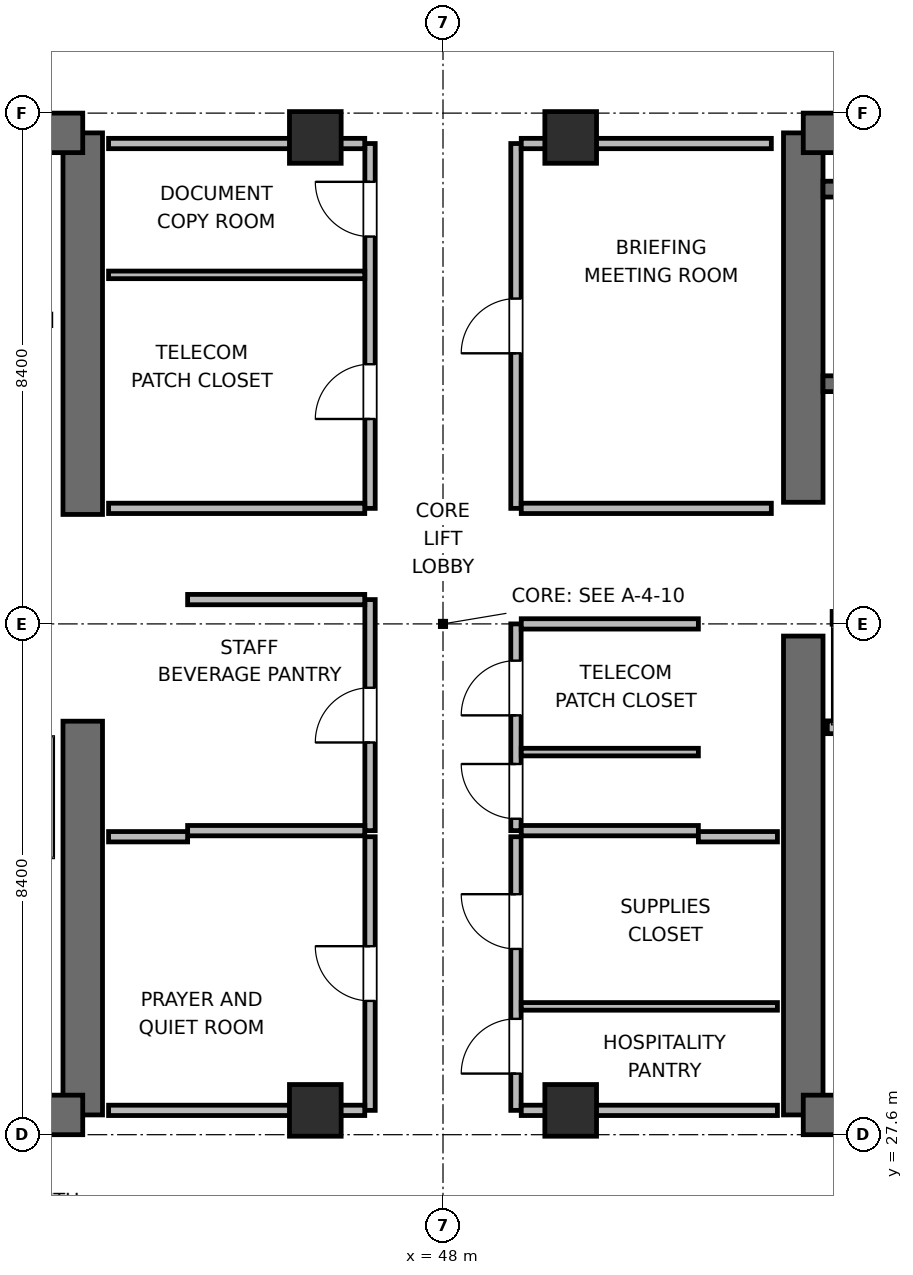
"""IFC4 building model, lengths in metres.
Left out: names, types, materials, properties, quantities, classifications, styles, units other than length and angle.
Written with IfcOpenShell. Run it as: python <this file> out.ifc"""

import sys

from ifc_helpers import new_model, si_unit, direction, frame, frame_2d, origin, origin_2d, place, context, subcontext, project, spatial, rectangle, extrude, element, fill, save


model = new_model("IFC4")
c1 = context("Model", 3, precision=1e-05, world=origin(), true_north=direction((0.0, 1.0)))
c2 = subcontext(c1, "Body", "Model", "MODEL_VIEW")
j1 = project(units=[si_unit("LENGTHUNIT", "METRE"), si_unit("PLANEANGLEUNIT", "RADIAN")], contexts=[c1])
p1 = place(None, origin())
s1 = spatial("IfcSite", under=j1, at=p1, CompositionType="ELEMENT")
p2 = place(p1, origin())
s2 = spatial("IfcBuilding", under=s1, at=p2, CompositionType="ELEMENT")
p3 = place(p2, frame((0.0, 0.0, 214.8)))
s3 = spatial("IfcBuildingStorey", under=s2, at=p3, CompositionType="ELEMENT", Elevation=214.8)
p4 = place(p3, frame((42.075, 27.925, 0.0), z_axis=(0.0, 0.0, 1.0), x_axis=(0.0, 1.0, 0.0)))
e1 = element("IfcWall", 1, at=p4, inside=s3, PredefinedType="SHEAR", context=c2, shape_type="SweptSolid", body=[
    extrude(rectangle(XDim=6.475, YDim=0.65, at=frame_2d((3.237, 0.0))), origin(), (0.0, 0.0, 1.0), 4.5),
])
p5 = place(p3, frame((42.075, 37.8, 0.0), z_axis=(0.0, 0.0, 1.0), x_axis=(0.0, 1.0, 0.0)))
e2 = element("IfcWall", 2, at=p5, inside=s3, PredefinedType="SHEAR", context=c2, shape_type="SweptSolid", body=[
    extrude(rectangle(XDim=6.275, YDim=0.65, at=frame_2d((3.137, 0.0))), origin(), (0.0, 0.0, 1.0), 4.5),
])
p6 = place(p3, frame((32.725, 27.925, 0.0), z_axis=(0.0, 0.0, 1.0), x_axis=(1.0, 0.0, 0.0)))
e3 = element("IfcWall", 3, at=p6, inside=s3, PredefinedType="SHEAR", context=c2, shape_type="SweptSolid", body=[
    extrude(rectangle(XDim=9.35, YDim=0.65, at=frame_2d((4.675, 0.0))), origin(), (0.0, 0.0, 1.0), 4.5),
])
p7 = place(p6, frame((5.025, 0.0, 0.0)))
e4 = element("IfcOpeningElement", 4, at=p7, cuts=e3, PredefinedType="OPENING", context=c2, shape_type="SweptSolid", body=[
    extrude(rectangle(XDim=1.05, YDim=2.04, at=frame_2d((0.525, 1.02))), frame((0.0, 0.335, 0.0), z_axis=(0.0, -1.0, 0.0), x_axis=(1.0, 0.0, 0.0)), (0.0, 0.0, 1.0), 0.67),
])
p8 = place(p3, frame((32.725, 44.075, 0.0), z_axis=(0.0, 0.0, 1.0), x_axis=(1.0, 0.0, 0.0)))
e5 = element("IfcWall", 5, at=p8, inside=s3, PredefinedType="SHEAR", context=c2, shape_type="SweptSolid", body=[
    extrude(rectangle(XDim=9.35, YDim=0.65, at=frame_2d((4.675, 0.0))), origin(), (0.0, 0.0, 1.0), 4.5),
])
p9 = place(p8, frame((1.025, 0.0, 0.0)))
e6 = element("IfcOpeningElement", 6, at=p9, cuts=e5, PredefinedType="OPENING", context=c2, shape_type="SweptSolid", body=[
    extrude(rectangle(XDim=0.95, YDim=2.04, at=frame_2d((0.475, 1.02))), frame((0.0, 0.335, 0.0), z_axis=(0.0, -1.0, 0.0), x_axis=(1.0, 0.0, 0.0)), (0.0, 0.0, 1.0), 0.67),
])
p10 = place(p8, frame((4.275, 0.0, 0.0)))
e7 = element("IfcOpeningElement", 7, at=p10, cuts=e5, PredefinedType="OPENING", context=c2, shape_type="SweptSolid", body=[
    extrude(rectangle(XDim=0.9, YDim=2.02, at=frame_2d((0.45, 1.01))), frame((0.0, 0.335, 0.0), z_axis=(0.0, -1.0, 0.0), x_axis=(1.0, 0.0, 0.0)), (0.0, 0.0, 1.0), 0.67),
])
p11 = place(p8, frame((7.175, 0.0, 0.0)))
e8 = element("IfcOpeningElement", 8, at=p11, cuts=e5, PredefinedType="OPENING", context=c2, shape_type="SweptSolid", body=[
    extrude(rectangle(XDim=0.9, YDim=2.02, at=frame_2d((0.45, 1.01))), frame((0.0, 0.335, 0.0), z_axis=(0.0, -1.0, 0.0), x_axis=(1.0, 0.0, 0.0)), (0.0, 0.0, 1.0), 0.67),
])
p12 = place(p3, frame((53.925, 27.925, 0.0), z_axis=(0.0, 0.0, 1.0), x_axis=(0.0, 1.0, 0.0)))
e9 = element("IfcWall", 9, at=p12, inside=s3, PredefinedType="SHEAR", context=c2, shape_type="SweptSolid", body=[
    extrude(rectangle(XDim=7.875, YDim=0.65, at=frame_2d((3.938, 0.0))), origin(), (0.0, 0.0, 1.0), 4.5),
])
p13 = place(p3, frame((53.925, 38.0, 0.0), z_axis=(0.0, 0.0, 1.0), x_axis=(0.0, 1.0, 0.0)))
e10 = element("IfcWall", 10, at=p13, inside=s3, PredefinedType="SHEAR", context=c2, shape_type="SweptSolid", body=[
    extrude(rectangle(XDim=6.075, YDim=0.65, at=frame_2d((3.038, 0.0))), origin(), (0.0, 0.0, 1.0), 4.5),
])
p14 = place(p3, frame((53.925, 27.925, 0.0), z_axis=(0.0, 0.0, 1.0), x_axis=(1.0, 0.0, 0.0)))
e11 = element("IfcWall", 11, at=p14, inside=s3, PredefinedType="SHEAR", context=c2, shape_type="SweptSolid", body=[
    extrude(rectangle(XDim=9.35, YDim=0.65, at=frame_2d((4.675, 0.0))), origin(), (0.0, 0.0, 1.0), 4.5),
])
p15 = place(p14, frame((3.975, 0.0, 0.0)))
e12 = element("IfcOpeningElement", 12, at=p15, cuts=e11, PredefinedType="OPENING", context=c2, shape_type="SweptSolid", body=[
    extrude(rectangle(XDim=1.05, YDim=2.04, at=frame_2d((0.525, 1.02))), frame((0.0, 0.335, 0.0), z_axis=(0.0, -1.0, 0.0), x_axis=(1.0, 0.0, 0.0)), (0.0, 0.0, 1.0), 0.67),
])
p16 = place(p3, frame((53.925, 44.075, 0.0), z_axis=(0.0, 0.0, 1.0), x_axis=(1.0, 0.0, 0.0)))
e13 = element("IfcWall", 13, at=p16, inside=s3, PredefinedType="SHEAR", context=c2, shape_type="SweptSolid", body=[
    extrude(rectangle(XDim=9.35, YDim=0.65, at=frame_2d((4.675, 0.0))), origin(), (0.0, 0.0, 1.0), 4.5),
])
p17 = place(p3, frame((54.25, 39.95, 0.0), z_axis=(0.0, 0.0, 1.0), x_axis=(1.0, 0.0, 0.0)))
e14 = element("IfcWall", 14, at=p17, inside=s3, PredefinedType="SHEAR", context=c2, shape_type="SweptSolid", body=[
    extrude(rectangle(XDim=8.7, YDim=0.26, at=frame_2d((4.35, 0.0))), origin(), (0.0, 0.0, 1.0), 4.5),
])
p18 = place(p17, frame((0.95, 0.0, 0.0)))
e15 = element("IfcOpeningElement", 15, at=p18, cuts=e14, PredefinedType="OPENING", context=c2, shape_type="SweptSolid", body=[
    extrude(rectangle(XDim=1.0, YDim=2.04, at=frame_2d((0.5, 1.02))), frame((0.0, 0.14, 0.0), z_axis=(0.0, -1.0, 0.0), x_axis=(1.0, 0.0, 0.0)), (0.0, 0.0, 1.0), 0.28),
])
p19 = place(p3, frame((54.25, 43.15, 0.0), z_axis=(0.0, 0.0, 1.0), x_axis=(1.0, 0.0, 0.0)))
e16 = element("IfcWall", 16, at=p19, inside=s3, PredefinedType="SHEAR", context=c2, shape_type="SweptSolid", body=[
    extrude(rectangle(XDim=8.7, YDim=0.26, at=frame_2d((4.35, 0.0))), origin(), (0.0, 0.0, 1.0), 4.5),
])
for number, where, z_axis, x_axis in (
    (17, (45.9, 28.0, 0.0), (0.0, 0.0, 1.0), (1.0, 0.0, 0.0)),
    (18, (50.1, 28.0, 0.0), (0.0, 0.0, 1.0), (1.0, 0.0, 0.0)),
    (19, (45.9, 44.0, 0.0), (0.0, 0.0, 1.0), (1.0, 0.0, 0.0)),
    (20, (50.1, 44.0, 0.0), (0.0, 0.0, 1.0), (1.0, 0.0, 0.0)),
):
    element("IfcColumn", number, at=place(p3, frame(where, z_axis=z_axis, x_axis=x_axis)), inside=s3, PredefinedType="COLUMN", context=c2, shape_type="SweptSolid", body=[
        extrude(rectangle(XDim=0.85, YDim=0.85, at=origin_2d()), origin(), (0.0, 0.0, 1.0), 4.5),
    ])
p20 = place(p3, frame((54.32, 34.3, 0.0), z_axis=(0.0, 0.0, 1.0), x_axis=(1.0, 0.0, 0.0)))
e21 = element("IfcWall", 21, at=p20, inside=s3, PredefinedType="PARTITIONING", context=c2, shape_type="SweptSolid", body=[
    extrude(rectangle(XDim=3.48, YDim=0.21, at=frame_2d((1.74, 0.0))), origin(), (0.0, 0.0, 1.0), 4.28),
])
p21 = place(p3, frame((54.4, 36.1, 0.0), z_axis=(0.0, 0.0, 1.0), x_axis=(1.0, 0.0, 0.0)))
e22 = element("IfcWall", 22, at=p21, inside=s3, PredefinedType="PARTITIONING", context=c2, shape_type="SweptSolid", body=[
    extrude(rectangle(XDim=2.1, YDim=0.21, at=frame_2d((1.05, 0.0))), origin(), (0.0, 0.0, 1.0), 4.28),
])
p22 = place(p21, frame((0.5, 0.0, 0.0)))
e23 = element("IfcOpeningElement", 23, at=p22, cuts=e22, PredefinedType="OPENING", context=c2, shape_type="SweptSolid", body=[
    extrude(rectangle(XDim=1.1, YDim=2.04, at=frame_2d((0.55, 1.02))), frame((0.0, 0.115, 0.0), z_axis=(0.0, -1.0, 0.0), x_axis=(1.0, 0.0, 0.0)), (0.0, 0.0, 1.0), 0.23),
])
p23 = place(p3, frame((46.8, 32.6, 0.0), z_axis=(0.0, 0.0, 1.0), x_axis=(0.0, 1.0, 0.0)))
e24 = element("IfcWall", 24, at=p23, inside=s3, PredefinedType="PARTITIONING", context=c2, shape_type="SweptSolid", body=[
    extrude(rectangle(XDim=3.8, YDim=0.17, at=frame_2d((1.9, 0.0))), origin(), (0.0, 0.0, 1.0), 4.28),
])
p24 = place(p23, frame((1.45, 0.0, 0.0)))
e25 = element("IfcOpeningElement", 25, at=p24, cuts=e24, PredefinedType="OPENING", context=c2, shape_type="SweptSolid", body=[
    extrude(rectangle(XDim=0.9, YDim=2.02, at=frame_2d((0.45, 1.01))), frame((0.0, 0.095, 0.0), z_axis=(0.0, -1.0, 0.0), x_axis=(1.0, 0.0, 0.0)), (0.0, 0.0, 1.0), 0.19),
])
for number, where, z_axis, x_axis in (
    (26, (43.8, 32.6, 0.0), (0.0, 0.0, 1.0), (1.0, 0.0, 0.0)),
    (27, (43.8, 36.4, 0.0), (0.0, 0.0, 1.0), (1.0, 0.0, 0.0)),
):
    element("IfcWall", number, at=place(p3, frame(where, z_axis=z_axis, x_axis=x_axis)), inside=s3, PredefinedType="PARTITIONING", context=c2, shape_type="SweptSolid", body=[
        extrude(rectangle(XDim=2.913, YDim=0.17, at=frame_2d((1.457, 0.0))), origin(), (0.0, 0.0, 1.0), 4.28),
    ])
p25 = place(p3, frame((49.2, 32.6, 0.0), z_axis=(0.0, 0.0, 1.0), x_axis=(0.0, 1.0, 0.0)))
e28 = element("IfcWall", 28, at=p25, inside=s3, PredefinedType="PARTITIONING", context=c2, shape_type="SweptSolid", body=[
    extrude(rectangle(XDim=3.4, YDim=0.17, at=frame_2d((1.7, 0.0))), origin(), (0.0, 0.0, 1.0), 4.28),
])
p26 = place(p25, frame((0.196, 0.0, 0.0)))
e29 = element("IfcOpeningElement", 29, at=p26, cuts=e28, PredefinedType="OPENING", context=c2, shape_type="SweptSolid", body=[
    extrude(rectangle(XDim=0.9, YDim=2.02, at=frame_2d((0.45, 1.01))), frame((0.0, 0.095, 0.0), z_axis=(0.0, -1.0, 0.0), x_axis=(1.0, 0.0, 0.0)), (0.0, 0.0, 1.0), 0.19),
])
p27 = place(p25, frame((1.896, 0.0, 0.0)))
e30 = element("IfcOpeningElement", 30, at=p27, cuts=e28, PredefinedType="OPENING", context=c2, shape_type="SweptSolid", body=[
    extrude(rectangle(XDim=0.9, YDim=2.02, at=frame_2d((0.45, 1.01))), frame((0.0, 0.095, 0.0), z_axis=(0.0, -1.0, 0.0), x_axis=(1.0, 0.0, 0.0)), (0.0, 0.0, 1.0), 0.19),
])
for number, where, z_axis, x_axis in (
    (31, (49.287, 32.6, 0.0), (0.0, 0.0, 1.0), (1.0, 0.0, 0.0)),
    (32, (49.287, 36.0, 0.0), (0.0, 0.0, 1.0), (1.0, 0.0, 0.0)),
):
    element("IfcWall", number, at=place(p3, frame(where, z_axis=z_axis, x_axis=x_axis)), inside=s3, PredefinedType="PARTITIONING", context=c2, shape_type="SweptSolid", body=[
        extrude(rectangle(XDim=2.913, YDim=0.17, at=frame_2d((1.457, 0.0))), origin(), (0.0, 0.0, 1.0), 4.28),
    ])
p28 = place(p3, frame((49.287, 33.892, 0.0), z_axis=(0.0, 0.0, 1.0), x_axis=(1.0, 0.0, 0.0)))
e33 = element("IfcWall", 33, at=p28, inside=s3, PredefinedType="PARTITIONING", context=c2, shape_type="SweptSolid", body=[
    extrude(rectangle(XDim=2.913, YDim=0.125, at=frame_2d((1.457, 0.0))), origin(), (0.0, 0.0, 1.0), 4.28),
])
p29 = place(p3, frame((46.8, 28.0, 0.0), z_axis=(0.0, 0.0, 1.0), x_axis=(0.0, 1.0, 0.0)))
e34 = element("IfcWall", 34, at=p29, inside=s3, PredefinedType="PARTITIONING", context=c2, shape_type="SweptSolid", body=[
    extrude(rectangle(XDim=4.5, YDim=0.17, at=frame_2d((2.25, 0.0))), origin(), (0.0, 0.0, 1.0), 4.28),
])
p30 = place(p29, frame((1.8, 0.0, 0.0)))
e35 = element("IfcOpeningElement", 35, at=p30, cuts=e34, PredefinedType="OPENING", context=c2, shape_type="SweptSolid", body=[
    extrude(rectangle(XDim=0.9, YDim=2.02, at=frame_2d((0.45, 1.01))), frame((0.0, 0.095, 0.0), z_axis=(0.0, -1.0, 0.0), x_axis=(1.0, 0.0, 0.0)), (0.0, 0.0, 1.0), 0.19),
])
p31 = place(p3, frame((42.5, 28.0, 0.0), z_axis=(0.0, 0.0, 1.0), x_axis=(1.0, 0.0, 0.0)))
e36 = element("IfcWall", 36, at=p31, inside=s3, PredefinedType="PARTITIONING", context=c2, shape_type="SweptSolid", body=[
    extrude(rectangle(XDim=4.213, YDim=0.17, at=frame_2d((2.106, 0.0))), origin(), (0.0, 0.0, 1.0), 3.365),
])
p32 = place(p3, frame((42.5, 32.5, 0.0), z_axis=(0.0, 0.0, 1.0), x_axis=(1.0, 0.0, 0.0)))
e37 = element("IfcWall", 37, at=p32, inside=s3, PredefinedType="PARTITIONING", context=c2, shape_type="SweptSolid", body=[
    extrude(rectangle(XDim=1.3, YDim=0.17, at=frame_2d((0.65, 0.0))), origin(), (0.0, 0.0, 1.0), 4.28),
])
p33 = place(p3, frame((49.2, 28.0, 0.0), z_axis=(0.0, 0.0, 1.0), x_axis=(0.0, 1.0, 0.0)))
e38 = element("IfcWall", 38, at=p33, inside=s3, PredefinedType="PARTITIONING", context=c2, shape_type="SweptSolid", body=[
    extrude(rectangle(XDim=4.5, YDim=0.17, at=frame_2d((2.25, 0.0))), origin(), (0.0, 0.0, 1.0), 4.28),
])
p34 = place(p33, frame((0.605, 0.0, 0.0)))
e39 = element("IfcOpeningElement", 39, at=p34, cuts=e38, PredefinedType="OPENING", context=c2, shape_type="SweptSolid", body=[
    extrude(rectangle(XDim=0.9, YDim=2.02, at=frame_2d((0.45, 1.01))), frame((0.0, 0.095, 0.0), z_axis=(0.0, -1.0, 0.0), x_axis=(1.0, 0.0, 0.0)), (0.0, 0.0, 1.0), 0.19),
])
p35 = place(p33, frame((2.655, 0.0, 0.0)))
e40 = element("IfcOpeningElement", 40, at=p35, cuts=e38, PredefinedType="OPENING", context=c2, shape_type="SweptSolid", body=[
    extrude(rectangle(XDim=0.9, YDim=2.02, at=frame_2d((0.45, 1.01))), frame((0.0, 0.095, 0.0), z_axis=(0.0, -1.0, 0.0), x_axis=(1.0, 0.0, 0.0)), (0.0, 0.0, 1.0), 0.19),
])
p36 = place(p3, frame((49.287, 28.0, 0.0), z_axis=(0.0, 0.0, 1.0), x_axis=(1.0, 0.0, 0.0)))
e41 = element("IfcWall", 41, at=p36, inside=s3, PredefinedType="PARTITIONING", context=c2, shape_type="SweptSolid", body=[
    extrude(rectangle(XDim=4.213, YDim=0.17, at=frame_2d((2.106, 0.0))), origin(), (0.0, 0.0, 1.0), 3.365),
])
p37 = place(p3, frame((52.2, 32.5, 0.0), z_axis=(0.0, 0.0, 1.0), x_axis=(1.0, 0.0, 0.0)))
e42 = element("IfcWall", 42, at=p37, inside=s3, PredefinedType="PARTITIONING", context=c2, shape_type="SweptSolid", body=[
    extrude(rectangle(XDim=1.3, YDim=0.17, at=frame_2d((0.65, 0.0))), origin(), (0.0, 0.0, 1.0), 4.28),
])
p38 = place(p3, frame((49.287, 29.71, 0.0), z_axis=(0.0, 0.0, 1.0), x_axis=(1.0, 0.0, 0.0)))
e43 = element("IfcWall", 43, at=p38, inside=s3, PredefinedType="PARTITIONING", context=c2, shape_type="SweptSolid", body=[
    extrude(rectangle(XDim=4.213, YDim=0.125, at=frame_2d((2.106, 0.0))), origin(), (0.0, 0.0, 1.0), 4.28),
])
p39 = place(p3, frame((46.8, 37.9, 0.0), z_axis=(0.0, 0.0, 1.0), x_axis=(0.0, 1.0, 0.0)))
e44 = element("IfcWall", 44, at=p39, inside=s3, PredefinedType="PARTITIONING", context=c2, shape_type="SweptSolid", body=[
    extrude(rectangle(XDim=6.0, YDim=0.17, at=frame_2d((3.0, 0.0))), origin(), (0.0, 0.0, 1.0), 4.28),
])
p40 = place(p39, frame((1.47, 0.0, 0.0)))
e45 = element("IfcOpeningElement", 45, at=p40, cuts=e44, PredefinedType="OPENING", context=c2, shape_type="SweptSolid", body=[
    extrude(rectangle(XDim=0.9, YDim=2.02, at=frame_2d((0.45, 1.01))), frame((0.0, 0.095, 0.0), z_axis=(0.0, -1.0, 0.0), x_axis=(1.0, 0.0, 0.0)), (0.0, 0.0, 1.0), 0.19),
])
p41 = place(p39, frame((4.47, 0.0, 0.0)))
e46 = element("IfcOpeningElement", 46, at=p41, cuts=e44, PredefinedType="OPENING", context=c2, shape_type="SweptSolid", body=[
    extrude(rectangle(XDim=0.9, YDim=2.02, at=frame_2d((0.45, 1.01))), frame((0.0, 0.095, 0.0), z_axis=(0.0, -1.0, 0.0), x_axis=(1.0, 0.0, 0.0)), (0.0, 0.0, 1.0), 0.19),
])
p42 = place(p3, frame((42.5, 37.9, 0.0), z_axis=(0.0, 0.0, 1.0), x_axis=(1.0, 0.0, 0.0)))
e47 = element("IfcWall", 47, at=p42, inside=s3, PredefinedType="PARTITIONING", context=c2, shape_type="SweptSolid", body=[
    extrude(rectangle(XDim=4.213, YDim=0.17, at=frame_2d((2.106, 0.0))), origin(), (0.0, 0.0, 1.0), 4.28),
])
p43 = place(p3, frame((42.5, 43.9, 0.0), z_axis=(0.0, 0.0, 1.0), x_axis=(1.0, 0.0, 0.0)))
e48 = element("IfcWall", 48, at=p43, inside=s3, PredefinedType="PARTITIONING", context=c2, shape_type="SweptSolid", body=[
    extrude(rectangle(XDim=4.213, YDim=0.17, at=frame_2d((2.106, 0.0))), origin(), (0.0, 0.0, 1.0), 3.365),
])
p44 = place(p3, frame((42.5, 41.74, 0.0), z_axis=(0.0, 0.0, 1.0), x_axis=(1.0, 0.0, 0.0)))
e49 = element("IfcWall", 49, at=p44, inside=s3, PredefinedType="PARTITIONING", context=c2, shape_type="SweptSolid", body=[
    extrude(rectangle(XDim=4.213, YDim=0.125, at=frame_2d((2.106, 0.0))), origin(), (0.0, 0.0, 1.0), 4.28),
])
p45 = place(p3, frame((49.2, 37.9, 0.0), z_axis=(0.0, 0.0, 1.0), x_axis=(0.0, 1.0, 0.0)))
e50 = element("IfcWall", 50, at=p45, inside=s3, PredefinedType="PARTITIONING", context=c2, shape_type="SweptSolid", body=[
    extrude(rectangle(XDim=6.0, YDim=0.17, at=frame_2d((3.0, 0.0))), origin(), (0.0, 0.0, 1.0), 4.28),
])
p46 = place(p45, frame((2.55, 0.0, 0.0)))
e51 = element("IfcOpeningElement", 51, at=p46, cuts=e50, PredefinedType="OPENING", context=c2, shape_type="SweptSolid", body=[
    extrude(rectangle(XDim=0.9, YDim=2.02, at=frame_2d((0.45, 1.01))), frame((0.0, 0.095, 0.0), z_axis=(0.0, -1.0, 0.0), x_axis=(1.0, 0.0, 0.0)), (0.0, 0.0, 1.0), 0.19),
])
p47 = place(p3, frame((49.287, 37.9, 0.0), z_axis=(0.0, 0.0, 1.0), x_axis=(1.0, 0.0, 0.0)))
e52 = element("IfcWall", 52, at=p47, inside=s3, PredefinedType="PARTITIONING", context=c2, shape_type="SweptSolid", body=[
    extrude(rectangle(XDim=4.113, YDim=0.17, at=frame_2d((2.056, 0.0))), origin(), (0.0, 0.0, 1.0), 4.28),
])
p48 = place(p3, frame((49.287, 43.9, 0.0), z_axis=(0.0, 0.0, 1.0), x_axis=(1.0, 0.0, 0.0)))
e53 = element("IfcWall", 53, at=p48, inside=s3, PredefinedType="PARTITIONING", context=c2, shape_type="SweptSolid", body=[
    extrude(rectangle(XDim=4.113, YDim=0.17, at=frame_2d((2.056, 0.0))), origin(), (0.0, 0.0, 1.0), 3.365),
])
p49 = place(p24, origin())
e54 = element("IfcDoor", 54, at=p49, inside=s3, OperationType="SINGLE_SWING_LEFT", PredefinedType="DOOR", context=c2, shape_type="SweptSolid", body=[
    extrude(rectangle(XDim=0.9, YDim=2.02, at=frame_2d((0.45, 1.01))), frame((0.0, 0.025, 0.0), z_axis=(0.0, -1.0, 0.0), x_axis=(1.0, 0.0, 0.0)), (0.0, 0.0, 1.0), 0.05),
])
fill(e25, e54)
p50 = place(p26, origin())
e55 = element("IfcDoor", 55, at=p50, inside=s3, OperationType="SINGLE_SWING_RIGHT", PredefinedType="DOOR", context=c2, shape_type="SweptSolid", body=[
    extrude(rectangle(XDim=0.9, YDim=2.02, at=frame_2d((0.45, 1.01))), frame((0.0, 0.025, 0.0), z_axis=(0.0, -1.0, 0.0), x_axis=(1.0, 0.0, 0.0)), (0.0, 0.0, 1.0), 0.05),
])
fill(e29, e55)
p51 = place(p27, origin())
e56 = element("IfcDoor", 56, at=p51, inside=s3, OperationType="SINGLE_SWING_LEFT", PredefinedType="DOOR", context=c2, shape_type="SweptSolid", body=[
    extrude(rectangle(XDim=0.9, YDim=2.02, at=frame_2d((0.45, 1.01))), frame((0.0, 0.025, 0.0), z_axis=(0.0, -1.0, 0.0), x_axis=(1.0, 0.0, 0.0)), (0.0, 0.0, 1.0), 0.05),
])
fill(e30, e56)
p52 = place(p30, origin())
e57 = element("IfcDoor", 57, at=p52, inside=s3, OperationType="SINGLE_SWING_RIGHT", PredefinedType="DOOR", context=c2, shape_type="SweptSolid", body=[
    extrude(rectangle(XDim=0.9, YDim=2.02, at=frame_2d((0.45, 1.01))), frame((0.0, 0.025, 0.0), z_axis=(0.0, -1.0, 0.0), x_axis=(1.0, 0.0, 0.0)), (0.0, 0.0, 1.0), 0.05),
])
fill(e35, e57)
p53 = place(p34, origin())
e58 = element("IfcDoor", 58, at=p53, inside=s3, OperationType="SINGLE_SWING_LEFT", PredefinedType="DOOR", context=c2, shape_type="SweptSolid", body=[
    extrude(rectangle(XDim=0.9, YDim=2.02, at=frame_2d((0.45, 1.01))), frame((0.0, 0.025, 0.0), z_axis=(0.0, -1.0, 0.0), x_axis=(1.0, 0.0, 0.0)), (0.0, 0.0, 1.0), 0.05),
])
fill(e39, e58)
p54 = place(p35, origin())
e59 = element("IfcDoor", 59, at=p54, inside=s3, OperationType="SINGLE_SWING_RIGHT", PredefinedType="DOOR", context=c2, shape_type="SweptSolid", body=[
    extrude(rectangle(XDim=0.9, YDim=2.02, at=frame_2d((0.45, 1.01))), frame((0.0, 0.025, 0.0), z_axis=(0.0, -1.0, 0.0), x_axis=(1.0, 0.0, 0.0)), (0.0, 0.0, 1.0), 0.05),
])
fill(e40, e59)
p55 = place(p40, origin())
e60 = element("IfcDoor", 60, at=p55, inside=s3, OperationType="SINGLE_SWING_LEFT", PredefinedType="DOOR", context=c2, shape_type="SweptSolid", body=[
    extrude(rectangle(XDim=0.9, YDim=2.02, at=frame_2d((0.45, 1.01))), frame((0.0, 0.025, 0.0), z_axis=(0.0, -1.0, 0.0), x_axis=(1.0, 0.0, 0.0)), (0.0, 0.0, 1.0), 0.05),
])
fill(e45, e60)
p56 = place(p41, origin())
e61 = element("IfcDoor", 61, at=p56, inside=s3, OperationType="SINGLE_SWING_RIGHT", PredefinedType="DOOR", context=c2, shape_type="SweptSolid", body=[
    extrude(rectangle(XDim=0.9, YDim=2.02, at=frame_2d((0.45, 1.01))), frame((0.0, 0.025, 0.0), z_axis=(0.0, -1.0, 0.0), x_axis=(1.0, 0.0, 0.0)), (0.0, 0.0, 1.0), 0.05),
])
fill(e46, e61)
p57 = place(p46, origin())
e62 = element("IfcDoor", 62, at=p57, inside=s3, OperationType="SINGLE_SWING_LEFT", PredefinedType="DOOR", context=c2, shape_type="SweptSolid", body=[
    extrude(rectangle(XDim=0.9, YDim=2.02, at=frame_2d((0.45, 1.01))), frame((0.0, 0.025, 0.0), z_axis=(0.0, -1.0, 0.0), x_axis=(1.0, 0.0, 0.0)), (0.0, 0.0, 1.0), 0.05),
])
fill(e51, e62)
save(model, sys.argv[1])
